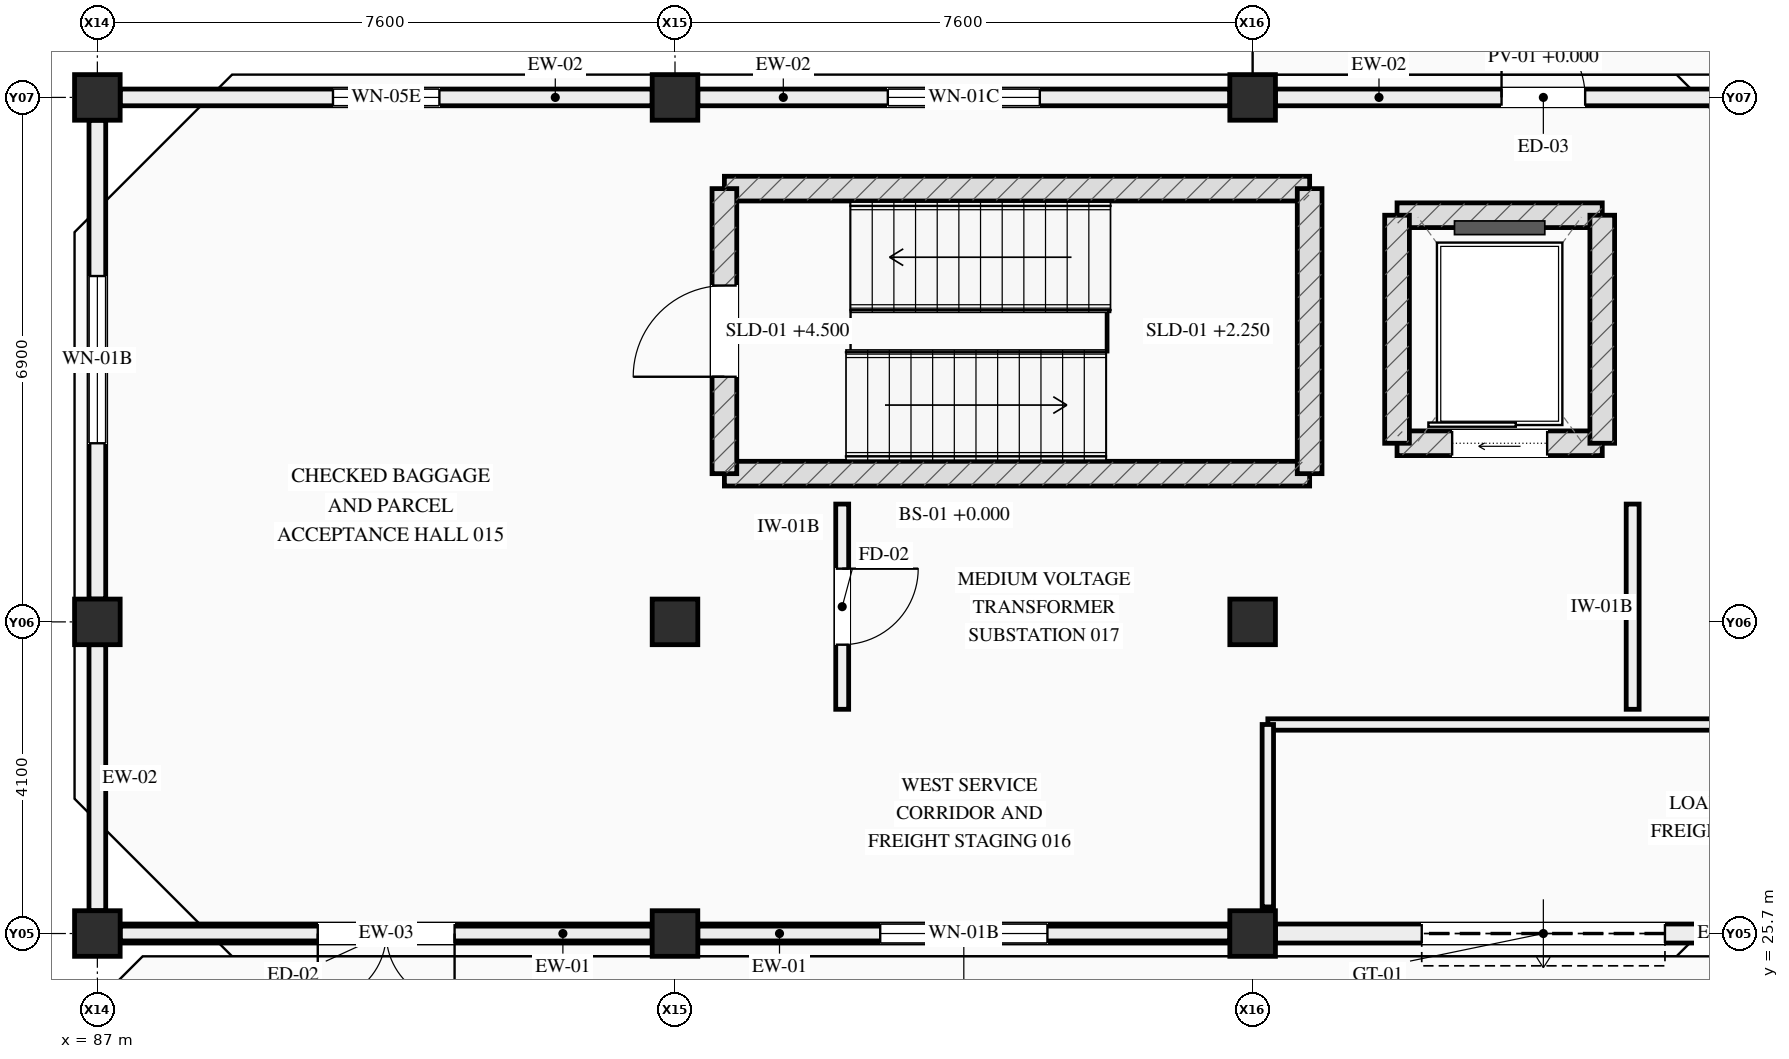
"""IFC4 building model, lengths in metres.
Left out: names, types, materials, properties, quantities, classifications, styles, units other than length and angle.
Written with IfcOpenShell. Run it as: python <this file> out.ifc"""

import sys

from ifc_helpers import new_model, si_unit, direction, frame, frame_2d, origin, origin_2d, place, context, subcontext, project, spatial, rectangle, extrude, element, fill, save


model = new_model("IFC4")
c1 = context("Model", 3, precision=1e-05, world=origin(), true_north=direction((0.0, 1.0)))
c2 = subcontext(c1, "Body", "Model", "MODEL_VIEW")
j1 = project(units=[si_unit("LENGTHUNIT", "METRE"), si_unit("PLANEANGLEUNIT", "RADIAN")], contexts=[c1])
p1 = place(None, origin())
s1 = spatial("IfcSite", under=j1, at=p1, CompositionType="ELEMENT")
p2 = place(p1, origin())
s2 = spatial("IfcBuilding", under=s1, at=p2, CompositionType="ELEMENT")
p3 = place(p2, origin())
s3 = spatial("IfcBuildingStorey", under=s2, at=p3, CompositionType="ELEMENT", Elevation=0.0)
for number, where, z_axis, x_axis in (
    (1, (87.0, 25.7, 0.0), (0.0, 0.0, 1.0), (1.0, 0.0, 0.0)),
    (2, (87.0, 29.8, 0.0), (0.0, 0.0, 1.0), (1.0, 0.0, 0.0)),
    (3, (87.0, 36.7, 0.0), (0.0, 0.0, 1.0), (1.0, 0.0, 0.0)),
    (4, (94.6, 25.7, 0.0), (0.0, 0.0, 1.0), (1.0, 0.0, 0.0)),
    (5, (94.6, 29.8, 0.0), (0.0, 0.0, 1.0), (1.0, 0.0, 0.0)),
    (6, (94.6, 36.7, 0.0), (0.0, 0.0, 1.0), (1.0, 0.0, 0.0)),
    (7, (102.2, 25.7, 0.0), (0.0, 0.0, 1.0), (1.0, 0.0, 0.0)),
    (8, (102.2, 29.8, 0.0), (0.0, 0.0, 1.0), (1.0, 0.0, 0.0)),
    (9, (102.2, 36.7, 0.0), (0.0, 0.0, 1.0), (1.0, 0.0, 0.0)),
):
    element("IfcColumn", number, at=place(p3, frame(where, z_axis=z_axis, x_axis=x_axis)), inside=s3, PredefinedType="COLUMN", context=c2, shape_type="SweptSolid", body=[
        extrude(rectangle(XDim=0.6, YDim=0.6, at=origin_2d()), origin(), (0.0, 0.0, 1.0), 4.5),
    ])
p4 = place(p3, frame((94.3, 25.7, 0.0), z_axis=(0.0, 0.0, 1.0), x_axis=(-1.0, 0.0, 0.0)))
e10 = element("IfcWall", 10, at=p4, inside=s3, PredefinedType="STANDARD", context=c2, shape_type="SweptSolid", body=[
    extrude(rectangle(XDim=7.0, YDim=0.25, at=frame_2d((3.5, 0.0))), origin(), (0.0, 0.0, 1.0), 2.985),
])
p5 = place(p4, frame((2.6, 0.0, 0.0)))
e11 = element("IfcOpeningElement", 11, at=p5, cuts=e10, PredefinedType="OPENING", context=c2, shape_type="SweptSolid", body=[
    extrude(rectangle(XDim=1.8, YDim=2.25, at=frame_2d((0.9, 1.125))), frame((0.0, 0.135, 0.0), z_axis=(0.0, -1.0, 0.0), x_axis=(1.0, 0.0, 0.0)), (0.0, 0.0, 1.0), 0.27),
])
p6 = place(p3, frame((94.3, 25.7, 3.35), z_axis=(0.0, 0.0, 1.0), x_axis=(-1.0, 0.0, 0.0)))
e12 = element("IfcWall", 12, at=p6, inside=s3, PredefinedType="STANDARD", context=c2, shape_type="SweptSolid", body=[
    extrude(rectangle(XDim=7.0, YDim=0.195, at=frame_2d((3.5, 0.0))), origin(), (0.0, 0.0, 1.0), 0.23),
])
p7 = place(p3, frame((87.3, 36.7, 0.0), z_axis=(0.0, 0.0, 1.0), x_axis=(1.0, 0.0, 0.0)))
e13 = element("IfcWall", 13, at=p7, inside=s3, PredefinedType="STANDARD", context=c2, shape_type="SweptSolid", body=[
    extrude(rectangle(XDim=7.0, YDim=0.22, at=frame_2d((3.5, 0.0))), origin(), (0.0, 0.0, 1.0), 3.58),
])
p8 = place(p7, frame((2.8, 0.0, 1.05)))
e14 = element("IfcOpeningElement", 14, at=p8, cuts=e13, PredefinedType="OPENING", context=c2, shape_type="SweptSolid", body=[
    extrude(rectangle(XDim=1.4, YDim=1.1, at=frame_2d((0.7, 0.55))), frame((0.0, 0.12, 0.0), z_axis=(0.0, -1.0, 0.0), x_axis=(1.0, 0.0, 0.0)), (0.0, 0.0, 1.0), 0.24),
])
p9 = place(p3, frame((101.9, 25.7, 0.0), z_axis=(0.0, 0.0, 1.0), x_axis=(-1.0, 0.0, 0.0)))
e15 = element("IfcWall", 15, at=p9, inside=s3, PredefinedType="STANDARD", context=c2, shape_type="SweptSolid", body=[
    extrude(rectangle(XDim=7.0, YDim=0.25, at=frame_2d((3.5, 0.0))), origin(), (0.0, 0.0, 1.0), 2.985),
])
p10 = place(p9, frame((2.4, 0.0, 0.88)))
e16 = element("IfcOpeningElement", 16, at=p10, cuts=e15, PredefinedType="OPENING", context=c2, shape_type="SweptSolid", body=[
    extrude(rectangle(XDim=2.2, YDim=1.45, at=frame_2d((1.1, 0.725))), frame((0.0, 0.135, 0.0), z_axis=(0.0, -1.0, 0.0), x_axis=(1.0, 0.0, 0.0)), (0.0, 0.0, 1.0), 0.27),
])
p11 = place(p3, frame((101.9, 25.7, 3.35), z_axis=(0.0, 0.0, 1.0), x_axis=(-1.0, 0.0, 0.0)))
e17 = element("IfcWall", 17, at=p11, inside=s3, PredefinedType="STANDARD", context=c2, shape_type="SweptSolid", body=[
    extrude(rectangle(XDim=7.0, YDim=0.195, at=frame_2d((3.5, 0.0))), origin(), (0.0, 0.0, 1.0), 0.23),
])
p12 = place(p3, frame((94.9, 36.7, 0.0), z_axis=(0.0, 0.0, 1.0), x_axis=(1.0, 0.0, 0.0)))
e18 = element("IfcWall", 18, at=p12, inside=s3, PredefinedType="STANDARD", context=c2, shape_type="SweptSolid", body=[
    extrude(rectangle(XDim=7.0, YDim=0.22, at=frame_2d((3.5, 0.0))), origin(), (0.0, 0.0, 1.0), 3.58),
])
p13 = place(p12, frame((2.5, 0.0, 0.92)))
e19 = element("IfcOpeningElement", 19, at=p13, cuts=e18, PredefinedType="OPENING", context=c2, shape_type="SweptSolid", body=[
    extrude(rectangle(XDim=2.0, YDim=1.5, at=frame_2d((1.0, 0.75))), frame((0.0, 0.12, 0.0), z_axis=(0.0, -1.0, 0.0), x_axis=(1.0, 0.0, 0.0)), (0.0, 0.0, 1.0), 0.24),
])
p14 = place(p3, frame((109.55, 25.7, 0.0), z_axis=(0.0, 0.0, 1.0), x_axis=(-1.0, 0.0, 0.0)))
e20 = element("IfcWall", 20, at=p14, inside=s3, PredefinedType="STANDARD", context=c2, shape_type="SweptSolid", body=[
    extrude(rectangle(XDim=7.05, YDim=0.25, at=frame_2d((3.525, 0.0))), origin(), (0.0, 0.0, 1.0), 3.39),
])
p15 = place(p14, frame((1.925, 0.0, 0.0)))
e21 = element("IfcOpeningElement", 21, at=p15, cuts=e20, PredefinedType="OPENING", context=c2, shape_type="SweptSolid", body=[
    extrude(rectangle(XDim=3.2, YDim=2.95, at=frame_2d((1.6, 1.475))), frame((0.0, 0.135, 0.0), z_axis=(0.0, -1.0, 0.0), x_axis=(1.0, 0.0, 0.0)), (0.0, 0.0, 1.0), 0.27),
])
p16 = place(p3, frame((102.5, 36.7, 0.0), z_axis=(0.0, 0.0, 1.0), x_axis=(1.0, 0.0, 0.0)))
e22 = element("IfcWall", 22, at=p16, inside=s3, PredefinedType="STANDARD", context=c2, shape_type="SweptSolid", body=[
    extrude(rectangle(XDim=7.05, YDim=0.22, at=frame_2d((3.525, 0.0))), origin(), (0.0, 0.0, 1.0), 3.58),
])
p17 = place(p16, frame((2.975, 0.0, 0.0)))
e23 = element("IfcOpeningElement", 23, at=p17, cuts=e22, PredefinedType="OPENING", context=c2, shape_type="SweptSolid", body=[
    extrude(rectangle(XDim=1.1, YDim=2.2, at=frame_2d((0.55, 1.1))), frame((0.0, 0.12, 0.0), z_axis=(0.0, -1.0, 0.0), x_axis=(1.0, 0.0, 0.0)), (0.0, 0.0, 1.0), 0.24),
])
p18 = place(p3, frame((87.0, 26.0, 0.0), z_axis=(0.0, 0.0, 1.0), x_axis=(0.0, 1.0, 0.0)))
e24 = element("IfcWall", 24, at=p18, inside=s3, PredefinedType="STANDARD", context=c2, shape_type="SweptSolid", body=[
    extrude(rectangle(XDim=3.5, YDim=0.22, at=frame_2d((1.75, 0.0))), origin(), (0.0, 0.0, 1.0), 3.58),
])
p19 = place(p3, frame((87.0, 30.1, 0.0), z_axis=(0.0, 0.0, 1.0), x_axis=(0.0, 1.0, 0.0)))
e25 = element("IfcWall", 25, at=p19, inside=s3, PredefinedType="STANDARD", context=c2, shape_type="SweptSolid", body=[
    extrude(rectangle(XDim=6.3, YDim=0.22, at=frame_2d((3.15, 0.0))), origin(), (0.0, 0.0, 1.0), 3.58),
])
p20 = place(p19, frame((2.05, 0.0, 0.88)))
e26 = element("IfcOpeningElement", 26, at=p20, cuts=e25, PredefinedType="OPENING", context=c2, shape_type="SweptSolid", body=[
    extrude(rectangle(XDim=2.2, YDim=1.45, at=frame_2d((1.1, 0.725))), frame((0.0, 0.12, 0.0), z_axis=(0.0, -1.0, 0.0), x_axis=(1.0, 0.0, 0.0)), (0.0, 0.0, 1.0), 0.24),
])
for number, where, z_axis, x_axis in (
    (27, (102.95, 31.75, 0.0), (0.0, 0.0, 1.0), (-1.0, 0.0, 0.0)),
    (28, (95.25, 35.5, 0.0), (0.0, 0.0, 1.0), (1.0, 0.0, 0.0)),
):
    element("IfcWall", number, at=place(p3, frame(where, z_axis=z_axis, x_axis=x_axis)), inside=s3, PredefinedType="SHEAR", context=c2, shape_type="SweptSolid", body=[
        extrude(rectangle(XDim=7.7, YDim=0.325, at=frame_2d((3.85, 0.0))), origin(), (0.0, 0.0, 1.0), 4.26),
    ])
p21 = place(p3, frame((95.25, 31.75, 0.0), z_axis=(0.0, 0.0, 1.0), x_axis=(0.0, 1.0, 0.0)))
e29 = element("IfcWall", 29, at=p21, inside=s3, PredefinedType="SHEAR", context=c2, shape_type="SweptSolid", body=[
    extrude(rectangle(XDim=3.75, YDim=0.325, at=frame_2d((1.875, 0.0))), origin(), (0.0, 0.0, 1.0), 4.26),
])
p22 = place(p21, frame((1.275, 0.0, 0.0)))
e30 = element("IfcOpeningElement", 30, at=p22, cuts=e29, PredefinedType="OPENING", context=c2, shape_type="SweptSolid", body=[
    extrude(rectangle(XDim=1.2, YDim=2.2, at=frame_2d((0.6, 1.1))), frame((0.0, 0.172, 0.0), z_axis=(0.0, -1.0, 0.0), x_axis=(1.0, 0.0, 0.0)), (0.0, 0.0, 1.0), 0.345),
])
p23 = place(p3, frame((102.95, 35.5, 0.0), z_axis=(0.0, 0.0, 1.0), x_axis=(0.0, -1.0, 0.0)))
e31 = element("IfcWall", 31, at=p23, inside=s3, PredefinedType="SHEAR", context=c2, shape_type="SweptSolid", body=[
    extrude(rectangle(XDim=3.75, YDim=0.325, at=frame_2d((1.875, 0.0))), origin(), (0.0, 0.0, 1.0), 4.26),
])
p24 = place(p3, frame((104.1, 32.15, 0.0), z_axis=(0.0, 0.0, 1.0), x_axis=(1.0, 0.0, 0.0)))
e32 = element("IfcWall", 32, at=p24, inside=s3, PredefinedType="SHEAR", context=c2, shape_type="SweptSolid", body=[
    extrude(rectangle(XDim=2.7, YDim=0.325, at=frame_2d((1.35, 0.0))), origin(), (0.0, 0.0, 1.0), 4.26),
])
p25 = place(p24, frame((0.725, 0.0, 0.0)))
e33 = element("IfcOpeningElement", 33, at=p25, cuts=e32, PredefinedType="OPENING", context=c2, shape_type="SweptSolid", body=[
    extrude(rectangle(XDim=1.25, YDim=2.2, at=frame_2d((0.625, 1.1))), frame((0.0, 0.172, 0.0), z_axis=(0.0, -1.0, 0.0), x_axis=(1.0, 0.0, 0.0)), (0.0, 0.0, 1.0), 0.345),
])
p26 = place(p3, frame((104.1, 35.15, 0.0), z_axis=(0.0, 0.0, 1.0), x_axis=(1.0, 0.0, 0.0)))
e34 = element("IfcWall", 34, at=p26, inside=s3, PredefinedType="SHEAR", context=c2, shape_type="SweptSolid", body=[
    extrude(rectangle(XDim=2.7, YDim=0.325, at=frame_2d((1.35, 0.0))), origin(), (0.0, 0.0, 1.0), 4.26),
])
for number, where, z_axis, x_axis in (
    (35, (104.1, 32.15, 0.0), (0.0, 0.0, 1.0), (0.0, 1.0, 0.0)),
    (36, (106.8, 32.15, 0.0), (0.0, 0.0, 1.0), (0.0, 1.0, 0.0)),
):
    element("IfcWall", number, at=place(p3, frame(where, z_axis=z_axis, x_axis=x_axis)), inside=s3, PredefinedType="SHEAR", context=c2, shape_type="SweptSolid", body=[
        extrude(rectangle(XDim=3.0, YDim=0.325, at=frame_2d((1.5, 0.0))), origin(), (0.0, 0.0, 1.0), 4.26),
    ])
p27 = place(p3, frame((102.4, 28.45, 0.0), z_axis=(0.0, 0.0, 1.0), x_axis=(1.0, 0.0, 0.0)))
e37 = element("IfcWall", 37, at=p27, inside=s3, PredefinedType="PARTITIONING", context=c2, shape_type="SweptSolid", body=[
    extrude(rectangle(XDim=14.9, YDim=0.15, at=frame_2d((7.45, 0.0))), origin(), (0.0, 0.0, 1.0), 3.3),
])
p28 = place(p27, frame((8.675, 0.0, 0.0)))
e38 = element("IfcOpeningElement", 38, at=p28, cuts=e37, PredefinedType="OPENING", context=c2, shape_type="SweptSolid", body=[
    extrude(rectangle(XDim=1.05, YDim=2.2, at=frame_2d((0.525, 1.1))), frame((0.0, 0.085, 0.0), z_axis=(0.0, -1.0, 0.0), x_axis=(1.0, 0.0, 0.0)), (0.0, 0.0, 1.0), 0.17),
])
p29 = place(p3, frame((102.4, 26.05, 0.0), z_axis=(0.0, 0.0, 1.0), x_axis=(0.0, 1.0, 0.0)))
e39 = element("IfcWall", 39, at=p29, inside=s3, PredefinedType="PARTITIONING", context=c2, shape_type="SweptSolid", body=[
    extrude(rectangle(XDim=2.4, YDim=0.15, at=frame_2d((1.2, 0.0))), origin(), (0.0, 0.0, 1.0), 3.3),
])
p30 = place(p3, frame((96.8, 28.65, 0.0), z_axis=(0.0, 0.0, 1.0), x_axis=(0.0, 1.0, 0.0)))
e40 = element("IfcWall", 40, at=p30, inside=s3, PredefinedType="SOLIDWALL", context=c2, shape_type="SweptSolid", body=[
    extrude(rectangle(XDim=2.7, YDim=0.17, at=frame_2d((1.35, 0.0))), origin(), (0.0, 0.0, 1.0), 3.3),
])
p31 = place(p30, frame((0.85, 0.0, 0.0)))
e41 = element("IfcOpeningElement", 41, at=p31, cuts=e40, PredefinedType="OPENING", context=c2, shape_type="SweptSolid", body=[
    extrude(rectangle(XDim=1.0, YDim=2.15, at=frame_2d((0.5, 1.075))), frame((0.0, 0.095, 0.0), z_axis=(0.0, -1.0, 0.0), x_axis=(1.0, 0.0, 0.0)), (0.0, 0.0, 1.0), 0.19),
])
p32 = place(p3, frame((107.2, 28.65, 0.0), z_axis=(0.0, 0.0, 1.0), x_axis=(0.0, 1.0, 0.0)))
e42 = element("IfcWall", 42, at=p32, inside=s3, PredefinedType="SOLIDWALL", context=c2, shape_type="SweptSolid", body=[
    extrude(rectangle(XDim=2.7, YDim=0.17, at=frame_2d((1.35, 0.0))), origin(), (0.0, 0.0, 1.0), 3.3),
])
p33 = place(p5, origin())
e43 = element("IfcDoor", 43, at=p33, inside=s3, OperationType="DOUBLE_DOOR_SINGLE_SWING", PredefinedType="DOOR", context=c2, shape_type="SweptSolid", body=[
    extrude(rectangle(XDim=1.8, YDim=2.25, at=frame_2d((0.9, 1.125))), frame((0.0, 0.025, 0.0), z_axis=(0.0, -1.0, 0.0), x_axis=(1.0, 0.0, 0.0)), (0.0, 0.0, 1.0), 0.05),
])
fill(e11, e43)
p34 = place(p8, origin())
e44 = element("IfcWindow", 44, at=p34, inside=s3, PartitioningType="SINGLE_PANEL", PredefinedType="WINDOW", context=c2, shape_type="SweptSolid", body=[
    extrude(rectangle(XDim=1.4, YDim=1.1, at=frame_2d((0.7, 0.55))), frame((0.0, 0.03, 0.0), z_axis=(0.0, -1.0, 0.0), x_axis=(1.0, 0.0, 0.0)), (0.0, 0.0, 1.0), 0.06),
])
fill(e14, e44)
p35 = place(p10, origin())
e45 = element("IfcWindow", 45, at=p35, inside=s3, PartitioningType="SINGLE_PANEL", PredefinedType="WINDOW", context=c2, shape_type="SweptSolid", body=[
    extrude(rectangle(XDim=2.2, YDim=1.45, at=frame_2d((1.1, 0.725))), frame((0.0, 0.03, 0.0), z_axis=(0.0, -1.0, 0.0), x_axis=(1.0, 0.0, 0.0)), (0.0, 0.0, 1.0), 0.06),
])
fill(e16, e45)
p36 = place(p13, origin())
e46 = element("IfcWindow", 46, at=p36, inside=s3, PartitioningType="SINGLE_PANEL", PredefinedType="WINDOW", context=c2, shape_type="SweptSolid", body=[
    extrude(rectangle(XDim=2.0, YDim=1.5, at=frame_2d((1.0, 0.75))), frame((0.0, 0.03, 0.0), z_axis=(0.0, -1.0, 0.0), x_axis=(1.0, 0.0, 0.0)), (0.0, 0.0, 1.0), 0.06),
])
fill(e19, e46)
p37 = place(p15, origin())
e47 = element("IfcDoor", 47, at=p37, inside=s3, OperationType="ROLLINGUP", PredefinedType="GATE", context=c2, shape_type="SweptSolid", body=[
    extrude(rectangle(XDim=3.2, YDim=2.95, at=frame_2d((1.6, 1.475))), frame((0.0, 0.025, 0.0), z_axis=(0.0, -1.0, 0.0), x_axis=(1.0, 0.0, 0.0)), (0.0, 0.0, 1.0), 0.05),
])
fill(e21, e47)
p38 = place(p17, origin())
e48 = element("IfcDoor", 48, at=p38, inside=s3, OperationType="SINGLE_SWING_LEFT", PredefinedType="DOOR", context=c2, shape_type="SweptSolid", body=[
    extrude(rectangle(XDim=1.1, YDim=2.2, at=frame_2d((0.55, 1.1))), frame((0.0, 0.025, 0.0), z_axis=(0.0, -1.0, 0.0), x_axis=(1.0, 0.0, 0.0)), (0.0, 0.0, 1.0), 0.05),
])
fill(e23, e48)
p39 = place(p20, origin())
e49 = element("IfcWindow", 49, at=p39, inside=s3, PartitioningType="SINGLE_PANEL", PredefinedType="WINDOW", context=c2, shape_type="SweptSolid", body=[
    extrude(rectangle(XDim=2.2, YDim=1.45, at=frame_2d((1.1, 0.725))), frame((0.0, 0.03, 0.0), z_axis=(0.0, -1.0, 0.0), x_axis=(1.0, 0.0, 0.0)), (0.0, 0.0, 1.0), 0.06),
])
fill(e26, e49)
p40 = place(p22, origin())
e50 = element("IfcDoor", 50, at=p40, inside=s3, OperationType="SINGLE_SWING_LEFT", PredefinedType="DOOR", context=c2, shape_type="SweptSolid", body=[
    extrude(rectangle(XDim=1.2, YDim=2.2, at=frame_2d((0.6, 1.1))), frame((0.0, 0.025, 0.0), z_axis=(0.0, -1.0, 0.0), x_axis=(1.0, 0.0, 0.0)), (0.0, 0.0, 1.0), 0.05),
])
fill(e30, e50)
p41 = place(p25, origin())
e51 = element("IfcDoor", 51, at=p41, inside=s3, OperationType="SLIDING_TO_LEFT", PredefinedType="DOOR", context=c2, shape_type="SweptSolid", body=[
    extrude(rectangle(XDim=1.25, YDim=2.2, at=frame_2d((0.625, 1.1))), frame((0.0, 0.025, 0.0), z_axis=(0.0, -1.0, 0.0), x_axis=(1.0, 0.0, 0.0)), (0.0, 0.0, 1.0), 0.05),
])
fill(e33, e51)
p42 = place(p31, origin())
e52 = element("IfcDoor", 52, at=p42, inside=s3, OperationType="SINGLE_SWING_RIGHT", PredefinedType="DOOR", context=c2, shape_type="SweptSolid", body=[
    extrude(rectangle(XDim=1.0, YDim=2.15, at=frame_2d((0.5, 1.075))), frame((0.0, 0.025, 0.0), z_axis=(0.0, -1.0, 0.0), x_axis=(1.0, 0.0, 0.0)), (0.0, 0.0, 1.0), 0.05),
])
fill(e41, e52)
save(model, sys.argv[1])
